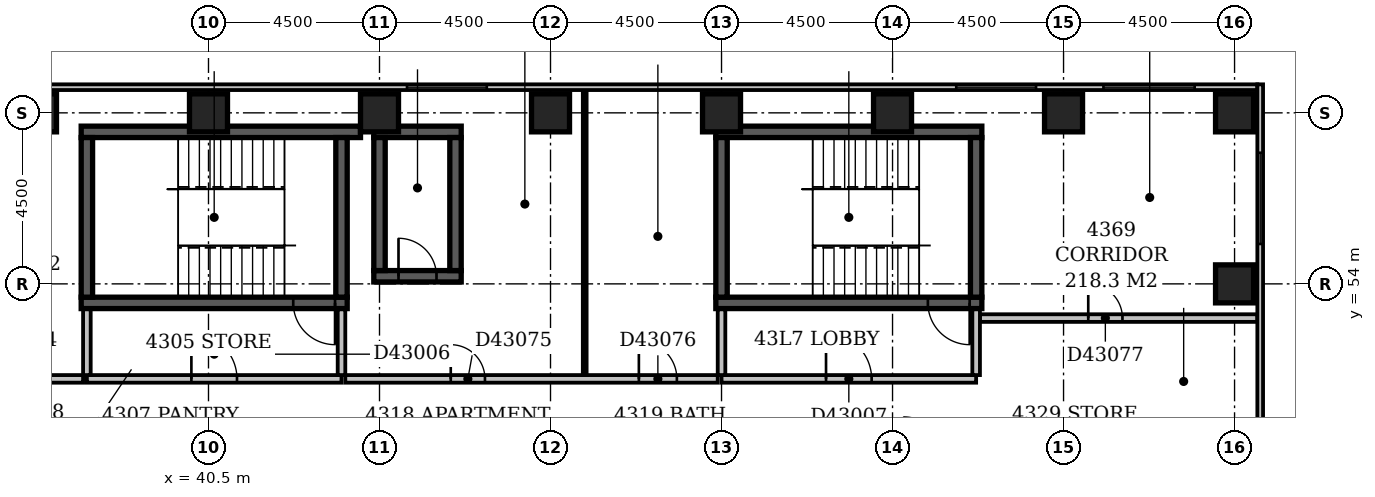
"""IFC4 building model, lengths in metres.
Left out: names, types, materials, properties, quantities, classifications, styles, units other than length and angle.
Written with IfcOpenShell. Run it as: python <this file> out.ifc"""

import sys

from ifc_helpers import new_model, si_unit, direction, frame, frame_2d, origin, origin_2d, place, context, subcontext, project, spatial, rectangle, extrude, element, fill, save


model = new_model("IFC4")
c1 = context("Model", 3, precision=1e-05, world=origin(), true_north=direction((0.0, 1.0)))
c2 = subcontext(c1, "Body", "Model", "MODEL_VIEW")
j1 = project(units=[si_unit("LENGTHUNIT", "METRE"), si_unit("PLANEANGLEUNIT", "RADIAN")], contexts=[c1])
p1 = place(None, origin())
s1 = spatial("IfcSite", under=j1, at=p1, CompositionType="ELEMENT")
p2 = place(p1, origin())
s2 = spatial("IfcBuilding", under=s1, at=p2, CompositionType="ELEMENT")
p3 = place(p2, frame((0.0, 0.0, 170.0)))
s3 = spatial("IfcBuildingStorey", under=s2, at=p3, CompositionType="ELEMENT", Elevation=170.0)
p4 = place(p3, frame((37.15, 53.5, -0.3), z_axis=(0.0, 0.0, 1.0), x_axis=(1.0, 0.0, 0.0)))
e1 = element("IfcWall", 1, at=p4, inside=s3, PredefinedType="SHEAR", context=c2, shape_type="SweptSolid", body=[
    extrude(rectangle(XDim=7.0, YDim=0.3, at=frame_2d((3.5, 0.0))), origin(), (0.0, 0.0, 1.0), 3.45),
])
p5 = place(p4, frame((5.58, 0.0, 0.3)))
e2 = element("IfcOpeningElement", 2, at=p5, cuts=e1, PredefinedType="OPENING", context=c2, shape_type="SweptSolid", body=[
    extrude(rectangle(XDim=1.1, YDim=2.1, at=frame_2d((0.55, 1.05))), frame((0.0, 0.162, 0.0), z_axis=(0.0, -1.0, 0.0), x_axis=(1.0, 0.0, 0.0)), (0.0, 0.0, 1.0), 0.324),
])
p6 = place(p3, frame((37.15, 58.0, -0.3), z_axis=(0.0, 0.0, 1.0), x_axis=(1.0, 0.0, 0.0)))
e3 = element("IfcWall", 3, at=p6, inside=s3, PredefinedType="SHEAR", context=c2, shape_type="SweptSolid", body=[
    extrude(rectangle(XDim=7.35, YDim=0.3, at=frame_2d((3.675, 0.0))), origin(), (0.0, 0.0, 1.0), 3.45),
])
for number, where, z_axis, x_axis in (
    (4, (37.3, 53.65, -0.3), (0.0, 0.0, 1.0), (0.0, 1.0, 0.0)),
    (5, (44.0, 53.65, -0.3), (0.0, 0.0, 1.0), (0.0, 1.0, 0.0)),
):
    element("IfcWall", number, at=place(p3, frame(where, z_axis=z_axis, x_axis=x_axis)), inside=s3, PredefinedType="SHEAR", context=c2, shape_type="SweptSolid", body=[
        extrude(rectangle(XDim=4.2, YDim=0.3, at=frame_2d((2.1, 0.0))), origin(), (0.0, 0.0, 1.0), 3.45),
    ])
p7 = place(p3, frame((44.85, 54.2, -0.3), z_axis=(0.0, 0.0, 1.0), x_axis=(1.0, 0.0, 0.0)))
e6 = element("IfcWall", 6, at=p7, inside=s3, PredefinedType="SHEAR", context=c2, shape_type="SweptSolid", body=[
    extrude(rectangle(XDim=2.3, YDim=0.3, at=frame_2d((1.15, 0.0))), origin(), (0.0, 0.0, 1.0), 3.45),
])
p8 = place(p7, frame((0.65, 0.0, 0.3)))
e7 = element("IfcOpeningElement", 7, at=p8, cuts=e6, PredefinedType="OPENING", context=c2, shape_type="SweptSolid", body=[
    extrude(rectangle(XDim=1.0, YDim=2.1, at=frame_2d((0.5, 1.05))), frame((0.0, 0.162, 0.0), z_axis=(0.0, -1.0, 0.0), x_axis=(1.0, 0.0, 0.0)), (0.0, 0.0, 1.0), 0.324),
])
p9 = place(p3, frame((44.85, 58.0, -0.3), z_axis=(0.0, 0.0, 1.0), x_axis=(1.0, 0.0, 0.0)))
e8 = element("IfcWall", 8, at=p9, inside=s3, PredefinedType="SHEAR", context=c2, shape_type="SweptSolid", body=[
    extrude(rectangle(XDim=2.3, YDim=0.3, at=frame_2d((1.15, 0.0))), origin(), (0.0, 0.0, 1.0), 3.45),
])
for number, where, z_axis, x_axis in (
    (9, (45.0, 54.35, -0.3), (0.0, 0.0, 1.0), (0.0, 1.0, 0.0)),
    (10, (47.0, 54.35, -0.3), (0.0, 0.0, 1.0), (0.0, 1.0, 0.0)),
):
    element("IfcWall", number, at=place(p3, frame(where, z_axis=z_axis, x_axis=x_axis)), inside=s3, PredefinedType="SHEAR", context=c2, shape_type="SweptSolid", body=[
        extrude(rectangle(XDim=3.5, YDim=0.3, at=frame_2d((1.75, 0.0))), origin(), (0.0, 0.0, 1.0), 3.45),
    ])
p10 = place(p3, frame((53.85, 53.5, -0.3), z_axis=(0.0, 0.0, 1.0), x_axis=(1.0, 0.0, 0.0)))
e11 = element("IfcWall", 11, at=p10, inside=s3, PredefinedType="SHEAR", context=c2, shape_type="SweptSolid", body=[
    extrude(rectangle(XDim=7.0, YDim=0.3, at=frame_2d((3.5, 0.0))), origin(), (0.0, 0.0, 1.0), 3.45),
])
p11 = place(p10, frame((5.58, 0.0, 0.3)))
e12 = element("IfcOpeningElement", 12, at=p11, cuts=e11, PredefinedType="OPENING", context=c2, shape_type="SweptSolid", body=[
    extrude(rectangle(XDim=1.1, YDim=2.1, at=frame_2d((0.55, 1.05))), frame((0.0, 0.162, 0.0), z_axis=(0.0, -1.0, 0.0), x_axis=(1.0, 0.0, 0.0)), (0.0, 0.0, 1.0), 0.324),
])
p12 = place(p3, frame((53.85, 58.0, -0.3), z_axis=(0.0, 0.0, 1.0), x_axis=(1.0, 0.0, 0.0)))
e13 = element("IfcWall", 13, at=p12, inside=s3, PredefinedType="SHEAR", context=c2, shape_type="SweptSolid", body=[
    extrude(rectangle(XDim=7.0, YDim=0.3, at=frame_2d((3.5, 0.0))), origin(), (0.0, 0.0, 1.0), 3.45),
])
for number, where, z_axis, x_axis in (
    (14, (54.0, 53.65, -0.3), (0.0, 0.0, 1.0), (0.0, 1.0, 0.0)),
    (15, (60.7, 53.65, -0.3), (0.0, 0.0, 1.0), (0.0, 1.0, 0.0)),
):
    element("IfcWall", number, at=place(p3, frame(where, z_axis=z_axis, x_axis=x_axis)), inside=s3, PredefinedType="SHEAR", context=c2, shape_type="SweptSolid", body=[
        extrude(rectangle(XDim=4.2, YDim=0.3, at=frame_2d((2.1, 0.0))), origin(), (0.0, 0.0, 1.0), 3.45),
    ])
for number, where, z_axis, x_axis in (
    (16, (67.5, 54.0, -0.3), (0.0, 0.0, 1.0), (1.0, 0.0, 0.0)),
    (17, (36.0, 58.5, -0.3), (0.0, 0.0, 1.0), (1.0, 0.0, 0.0)),
    (18, (40.5, 58.5, -0.3), (0.0, 0.0, 1.0), (1.0, 0.0, 0.0)),
    (19, (45.0, 58.5, -0.3), (0.0, 0.0, 1.0), (1.0, 0.0, 0.0)),
    (20, (49.5, 58.5, -0.3), (0.0, 0.0, 1.0), (1.0, 0.0, 0.0)),
    (21, (54.0, 58.5, -0.3), (0.0, 0.0, 1.0), (1.0, 0.0, 0.0)),
    (22, (58.5, 58.5, -0.3), (0.0, 0.0, 1.0), (1.0, 0.0, 0.0)),
    (23, (63.0, 58.5, -0.3), (0.0, 0.0, 1.0), (1.0, 0.0, 0.0)),
    (24, (67.5, 58.5, -0.3), (0.0, 0.0, 1.0), (1.0, 0.0, 0.0)),
):
    element("IfcColumn", number, at=place(p3, frame(where, z_axis=z_axis, x_axis=x_axis)), inside=s3, PredefinedType="COLUMN", context=c2, shape_type="SweptSolid", body=[
        extrude(rectangle(XDim=1.0, YDim=1.0, at=origin_2d()), origin(), (0.0, 0.0, 1.0), 3.45),
    ])
p13 = place(p3, frame((68.175, 35.4, 0.0), z_axis=(0.0, 0.0, 1.0), x_axis=(0.0, 1.0, 0.0)))
e25 = element("IfcWall", 25, at=p13, inside=s3, PredefinedType="STANDARD", context=c2, shape_type="SweptSolid", body=[
    extrude(rectangle(XDim=23.85, YDim=0.15, at=frame_2d((11.925, 0.0))), origin(), (0.0, 0.0, 1.0), 2.5),
])
p14 = place(p13, frame((1.65, 0.0, 0.6)))
e26 = element("IfcOpeningElement", 26, at=p14, cuts=e25, PredefinedType="OPENING", context=c2, shape_type="SweptSolid", body=[
    extrude(rectangle(XDim=2.4, YDim=1.8, at=frame_2d((1.2, 0.9))), frame((0.0, 0.087, 0.0), z_axis=(0.0, -1.0, 0.0), x_axis=(1.0, 0.0, 0.0)), (0.0, 0.0, 1.0), 0.174),
])
p15 = place(p13, frame((10.65, 0.0, 0.6)))
e27 = element("IfcOpeningElement", 27, at=p15, cuts=e25, PredefinedType="OPENING", context=c2, shape_type="SweptSolid", body=[
    extrude(rectangle(XDim=2.4, YDim=1.8, at=frame_2d((1.2, 0.9))), frame((0.0, 0.087, 0.0), z_axis=(0.0, -1.0, 0.0), x_axis=(1.0, 0.0, 0.0)), (0.0, 0.0, 1.0), 0.174),
])
p16 = place(p13, frame((19.65, 0.0, 0.6)))
e28 = element("IfcOpeningElement", 28, at=p16, cuts=e25, PredefinedType="OPENING", context=c2, shape_type="SweptSolid", body=[
    extrude(rectangle(XDim=2.4, YDim=1.8, at=frame_2d((1.2, 0.9))), frame((0.0, 0.087, 0.0), z_axis=(0.0, -1.0, 0.0), x_axis=(1.0, 0.0, 0.0)), (0.0, 0.0, 1.0), 0.174),
])
p17 = place(p3, frame((68.1, 59.175, 0.0), z_axis=(0.0, 0.0, 1.0), x_axis=(-1.0, 0.0, 0.0)))
e29 = element("IfcWall", 29, at=p17, inside=s3, PredefinedType="STANDARD", context=c2, shape_type="SweptSolid", body=[
    extrude(rectangle(XDim=68.85, YDim=0.15, at=frame_2d((34.425, 0.0))), origin(), (0.0, 0.0, 1.0), 2.5),
])
p18 = place(p17, frame((1.65, 0.0, 0.6)))
e30 = element("IfcOpeningElement", 30, at=p18, cuts=e29, PredefinedType="OPENING", context=c2, shape_type="SweptSolid", body=[
    extrude(rectangle(XDim=2.4, YDim=1.8, at=frame_2d((1.2, 0.9))), frame((0.0, 0.087, 0.0), z_axis=(0.0, -1.0, 0.0), x_axis=(1.0, 0.0, 0.0)), (0.0, 0.0, 1.0), 0.174),
])
p19 = place(p17, frame((5.823, 0.0, 0.6)))
e31 = element("IfcOpeningElement", 31, at=p19, cuts=e29, PredefinedType="OPENING", context=c2, shape_type="SweptSolid", body=[
    extrude(rectangle(XDim=2.1, YDim=1.8, at=frame_2d((1.05, 0.9))), frame((0.0, 0.087, 0.0), z_axis=(0.0, -1.0, 0.0), x_axis=(1.0, 0.0, 0.0)), (0.0, 0.0, 1.0), 0.174),
])
p20 = place(p17, frame((20.277, 0.0, 0.6)))
e32 = element("IfcOpeningElement", 32, at=p20, cuts=e29, PredefinedType="OPENING", context=c2, shape_type="SweptSolid", body=[
    extrude(rectangle(XDim=2.1, YDim=1.8, at=frame_2d((1.05, 0.9))), frame((0.0, 0.087, 0.0), z_axis=(0.0, -1.0, 0.0), x_axis=(1.0, 0.0, 0.0)), (0.0, 0.0, 1.0), 0.174),
])
p21 = place(p3, frame((37.3, 51.5, 0.0), z_axis=(0.0, 0.0, 1.0), x_axis=(1.0, 0.0, 0.0)))
e33 = element("IfcWall", 33, at=p21, inside=s3, PredefinedType="PARTITIONING", context=c2, shape_type="SweptSolid", body=[
    extrude(rectangle(XDim=6.7, YDim=0.2, at=frame_2d((3.35, 0.0))), origin(), (0.0, 0.0, 1.0), 3.15),
])
p22 = place(p21, frame((2.75, 0.0, 0.0)))
e34 = element("IfcOpeningElement", 34, at=p22, cuts=e33, PredefinedType="OPENING", context=c2, shape_type="SweptSolid", body=[
    extrude(rectangle(XDim=1.2, YDim=2.1, at=frame_2d((0.6, 1.05))), frame((0.0, 0.112, 0.0), z_axis=(0.0, -1.0, 0.0), x_axis=(1.0, 0.0, 0.0)), (0.0, 0.0, 1.0), 0.224),
])
for number, where, z_axis, x_axis in (
    (35, (44.0, 51.6, 0.0), (0.0, 0.0, 1.0), (0.0, 1.0, 0.0)),
    (36, (37.3, 51.6, 0.0), (0.0, 0.0, 1.0), (0.0, 1.0, 0.0)),
):
    element("IfcWall", number, at=place(p3, frame(where, z_axis=z_axis, x_axis=x_axis)), inside=s3, PredefinedType="PARTITIONING", context=c2, shape_type="SweptSolid", body=[
        extrude(rectangle(XDim=1.73, YDim=0.2, at=frame_2d((0.865, 0.0))), origin(), (0.0, 0.0, 1.0), 3.15),
    ])
p23 = place(p3, frame((54.0, 51.5, 0.0), z_axis=(0.0, 0.0, 1.0), x_axis=(1.0, 0.0, 0.0)))
e37 = element("IfcWall", 37, at=p23, inside=s3, PredefinedType="PARTITIONING", context=c2, shape_type="SweptSolid", body=[
    extrude(rectangle(XDim=6.7, YDim=0.2, at=frame_2d((3.35, 0.0))), origin(), (0.0, 0.0, 1.0), 3.15),
])
p24 = place(p23, frame((2.75, 0.0, 0.0)))
e38 = element("IfcOpeningElement", 38, at=p24, cuts=e37, PredefinedType="OPENING", context=c2, shape_type="SweptSolid", body=[
    extrude(rectangle(XDim=1.2, YDim=2.1, at=frame_2d((0.6, 1.05))), frame((0.0, 0.112, 0.0), z_axis=(0.0, -1.0, 0.0), x_axis=(1.0, 0.0, 0.0)), (0.0, 0.0, 1.0), 0.224),
])
p25 = place(p3, frame((60.7, 51.6, 0.0), z_axis=(0.0, 0.0, 1.0), x_axis=(0.0, 1.0, 0.0)))
e39 = element("IfcWall", 39, at=p25, inside=s3, PredefinedType="PARTITIONING", context=c2, shape_type="SweptSolid", body=[
    extrude(rectangle(XDim=1.73, YDim=0.2, at=frame_2d((0.865, 0.0))), origin(), (0.0, 0.0, 1.0), 3.15),
])
p26 = place(p3, frame((54.0, 51.6, 0.0), z_axis=(0.0, 0.0, 1.0), x_axis=(0.0, 1.0, 0.0)))
e40 = element("IfcWall", 40, at=p26, inside=s3, PredefinedType="PARTITIONING", context=c2, shape_type="SweptSolid", body=[
    extrude(rectangle(XDim=1.73, YDim=0.2, at=frame_2d((0.865, 0.0))), origin(), (0.0, 0.0, 1.0), 2.45),
])
p27 = place(p3, frame((27.9, 51.5, 0.0), z_axis=(0.0, 0.0, 1.0), x_axis=(1.0, 0.0, 0.0)))
e41 = element("IfcWall", 41, at=p27, inside=s3, PredefinedType="PARTITIONING", context=c2, shape_type="SweptSolid", body=[
    extrude(rectangle(XDim=9.3, YDim=0.2, at=frame_2d((4.65, 0.0))), origin(), (0.0, 0.0, 1.0), 3.15),
])
p28 = place(p27, frame((2.375, 0.0, 0.0)))
e42 = element("IfcOpeningElement", 42, at=p28, cuts=e41, PredefinedType="OPENING", context=c2, shape_type="SweptSolid", body=[
    extrude(rectangle(XDim=1.0, YDim=2.1, at=frame_2d((0.5, 1.05))), frame((0.0, 0.112, 0.0), z_axis=(0.0, -1.0, 0.0), x_axis=(1.0, 0.0, 0.0)), (0.0, 0.0, 1.0), 0.224),
])
p29 = place(p27, frame((7.125, 0.0, 0.0)))
e43 = element("IfcOpeningElement", 43, at=p29, cuts=e41, PredefinedType="OPENING", context=c2, shape_type="SweptSolid", body=[
    extrude(rectangle(XDim=1.0, YDim=2.1, at=frame_2d((0.5, 1.05))), frame((0.0, 0.112, 0.0), z_axis=(0.0, -1.0, 0.0), x_axis=(1.0, 0.0, 0.0)), (0.0, 0.0, 1.0), 0.224),
])
p30 = place(p3, frame((44.1, 51.5, 0.0), z_axis=(0.0, 0.0, 1.0), x_axis=(1.0, 0.0, 0.0)))
e44 = element("IfcWall", 44, at=p30, inside=s3, PredefinedType="PARTITIONING", context=c2, shape_type="SweptSolid", body=[
    extrude(rectangle(XDim=9.8, YDim=0.2, at=frame_2d((4.9, 0.0))), origin(), (0.0, 0.0, 1.0), 3.15),
])
p31 = place(p30, frame((2.775, 0.0, 0.0)))
e45 = element("IfcOpeningElement", 45, at=p31, cuts=e44, PredefinedType="OPENING", context=c2, shape_type="SweptSolid", body=[
    extrude(rectangle(XDim=0.9, YDim=2.1, at=frame_2d((0.45, 1.05))), frame((0.0, 0.112, 0.0), z_axis=(0.0, -1.0, 0.0), x_axis=(1.0, 0.0, 0.0)), (0.0, 0.0, 1.0), 0.224),
])
p32 = place(p30, frame((7.725, 0.0, 0.0)))
e46 = element("IfcOpeningElement", 46, at=p32, cuts=e44, PredefinedType="OPENING", context=c2, shape_type="SweptSolid", body=[
    extrude(rectangle(XDim=1.0, YDim=2.1, at=frame_2d((0.5, 1.05))), frame((0.0, 0.112, 0.0), z_axis=(0.0, -1.0, 0.0), x_axis=(1.0, 0.0, 0.0)), (0.0, 0.0, 1.0), 0.224),
])
p33 = place(p3, frame((50.4, 51.6, 0.0), z_axis=(0.0, 0.0, 1.0), x_axis=(0.0, 1.0, 0.0)))
e47 = element("IfcWall", 47, at=p33, inside=s3, PredefinedType="PARTITIONING", context=c2, shape_type="SweptSolid", body=[
    extrude(rectangle(XDim=7.5, YDim=0.1, at=frame_2d((3.75, 0.0))), origin(), (0.0, 0.0, 1.0), 3.15),
])
p34 = place(p3, frame((60.8, 53.1, 0.0), z_axis=(0.0, 0.0, 1.0), x_axis=(1.0, 0.0, 0.0)))
e48 = element("IfcWall", 48, at=p34, inside=s3, PredefinedType="PARTITIONING", context=c2, shape_type="SweptSolid", body=[
    extrude(rectangle(XDim=7.3, YDim=0.2, at=frame_2d((3.65, 0.0))), origin(), (0.0, 0.0, 1.0), 3.15),
])
p35 = place(p34, frame((2.85, 0.0, 0.0)))
e49 = element("IfcOpeningElement", 49, at=p35, cuts=e48, PredefinedType="OPENING", context=c2, shape_type="SweptSolid", body=[
    extrude(rectangle(XDim=0.9, YDim=2.1, at=frame_2d((0.45, 1.05))), frame((0.0, 0.112, 0.0), z_axis=(0.0, -1.0, 0.0), x_axis=(1.0, 0.0, 0.0)), (0.0, 0.0, 1.0), 0.224),
])
p36 = place(p16, origin())
e50 = element("IfcWindow", 50, at=p36, inside=s3, PartitioningType="SINGLE_PANEL", PredefinedType="WINDOW", context=c2, shape_type="SweptSolid", body=[
    extrude(rectangle(XDim=2.4, YDim=1.8, at=frame_2d((1.2, 0.9))), frame((0.0, 0.03, 0.0), z_axis=(0.0, -1.0, 0.0), x_axis=(1.0, 0.0, 0.0)), (0.0, 0.0, 1.0), 0.06),
])
fill(e28, e50)
p37 = place(p18, origin())
e51 = element("IfcWindow", 51, at=p37, inside=s3, PartitioningType="SINGLE_PANEL", PredefinedType="WINDOW", context=c2, shape_type="SweptSolid", body=[
    extrude(rectangle(XDim=2.4, YDim=1.8, at=frame_2d((1.2, 0.9))), frame((0.0, 0.03, 0.0), z_axis=(0.0, -1.0, 0.0), x_axis=(1.0, 0.0, 0.0)), (0.0, 0.0, 1.0), 0.06),
])
fill(e30, e51)
p38 = place(p19, origin())
e52 = element("IfcWindow", 52, at=p38, inside=s3, PartitioningType="SINGLE_PANEL", PredefinedType="WINDOW", context=c2, shape_type="SweptSolid", body=[
    extrude(rectangle(XDim=2.1, YDim=1.8, at=frame_2d((1.05, 0.9))), frame((0.0, 0.03, 0.0), z_axis=(0.0, -1.0, 0.0), x_axis=(1.0, 0.0, 0.0)), (0.0, 0.0, 1.0), 0.06),
])
fill(e31, e52)
p39 = place(p20, origin())
e53 = element("IfcWindow", 53, at=p39, inside=s3, PartitioningType="SINGLE_PANEL", PredefinedType="WINDOW", context=c2, shape_type="SweptSolid", body=[
    extrude(rectangle(XDim=2.1, YDim=1.8, at=frame_2d((1.05, 0.9))), frame((0.0, 0.03, 0.0), z_axis=(0.0, -1.0, 0.0), x_axis=(1.0, 0.0, 0.0)), (0.0, 0.0, 1.0), 0.06),
])
fill(e32, e53)
p40 = place(p22, origin())
e54 = element("IfcDoor", 54, at=p40, inside=s3, OperationType="SINGLE_SWING_LEFT", PredefinedType="DOOR", context=c2, shape_type="SweptSolid", body=[
    extrude(rectangle(XDim=1.2, YDim=2.1, at=frame_2d((0.6, 1.05))), frame((0.0, 0.025, 0.0), z_axis=(0.0, -1.0, 0.0), x_axis=(1.0, 0.0, 0.0)), (0.0, 0.0, 1.0), 0.05),
])
fill(e34, e54)
p41 = place(p24, origin())
e55 = element("IfcDoor", 55, at=p41, inside=s3, OperationType="SINGLE_SWING_LEFT", PredefinedType="DOOR", context=c2, shape_type="SweptSolid", body=[
    extrude(rectangle(XDim=1.2, YDim=2.1, at=frame_2d((0.6, 1.05))), frame((0.0, 0.025, 0.0), z_axis=(0.0, -1.0, 0.0), x_axis=(1.0, 0.0, 0.0)), (0.0, 0.0, 1.0), 0.05),
])
fill(e38, e55)
p42 = place(p8, origin())
e56 = element("IfcDoor", 56, at=p42, inside=s3, OperationType="SINGLE_SWING_LEFT", PredefinedType="DOOR", context=c2, shape_type="SweptSolid", body=[
    extrude(rectangle(XDim=1.0, YDim=2.1, at=frame_2d((0.5, 1.05))), frame((0.0, 0.025, 0.0), z_axis=(0.0, -1.0, 0.0), x_axis=(1.0, 0.0, 0.0)), (0.0, 0.0, 1.0), 0.05),
])
fill(e7, e56)
p43 = place(p5, origin())
e57 = element("IfcDoor", 57, at=p43, inside=s3, OperationType="SINGLE_SWING_RIGHT", PredefinedType="DOOR", context=c2, shape_type="SweptSolid", body=[
    extrude(rectangle(XDim=1.1, YDim=2.1, at=frame_2d((0.55, 1.05))), frame((0.0, 0.025, 0.0), z_axis=(0.0, -1.0, 0.0), x_axis=(1.0, 0.0, 0.0)), (0.0, 0.0, 1.0), 0.05),
])
fill(e2, e57)
p44 = place(p11, origin())
e58 = element("IfcDoor", 58, at=p44, inside=s3, OperationType="SINGLE_SWING_RIGHT", PredefinedType="DOOR", context=c2, shape_type="SweptSolid", body=[
    extrude(rectangle(XDim=1.1, YDim=2.1, at=frame_2d((0.55, 1.05))), frame((0.0, 0.025, 0.0), z_axis=(0.0, -1.0, 0.0), x_axis=(1.0, 0.0, 0.0)), (0.0, 0.0, 1.0), 0.05),
])
fill(e12, e58)
p45 = place(p31, origin())
e59 = element("IfcDoor", 59, at=p45, inside=s3, OperationType="SINGLE_SWING_LEFT", PredefinedType="DOOR", context=c2, shape_type="SweptSolid", body=[
    extrude(rectangle(XDim=0.9, YDim=2.1, at=frame_2d((0.45, 1.05))), frame((0.0, 0.025, 0.0), z_axis=(0.0, -1.0, 0.0), x_axis=(1.0, 0.0, 0.0)), (0.0, 0.0, 1.0), 0.05),
])
fill(e45, e59)
p46 = place(p32, origin())
e60 = element("IfcDoor", 60, at=p46, inside=s3, OperationType="SINGLE_SWING_LEFT", PredefinedType="DOOR", context=c2, shape_type="SweptSolid", body=[
    extrude(rectangle(XDim=1.0, YDim=2.1, at=frame_2d((0.5, 1.05))), frame((0.0, 0.025, 0.0), z_axis=(0.0, -1.0, 0.0), x_axis=(1.0, 0.0, 0.0)), (0.0, 0.0, 1.0), 0.05),
])
fill(e46, e60)
p47 = place(p35, origin())
e61 = element("IfcDoor", 61, at=p47, inside=s3, OperationType="SINGLE_SWING_LEFT", PredefinedType="DOOR", context=c2, shape_type="SweptSolid", body=[
    extrude(rectangle(XDim=0.9, YDim=2.1, at=frame_2d((0.45, 1.05))), frame((0.0, 0.025, 0.0), z_axis=(0.0, -1.0, 0.0), x_axis=(1.0, 0.0, 0.0)), (0.0, 0.0, 1.0), 0.05),
])
fill(e49, e61)
save(model, sys.argv[1])
